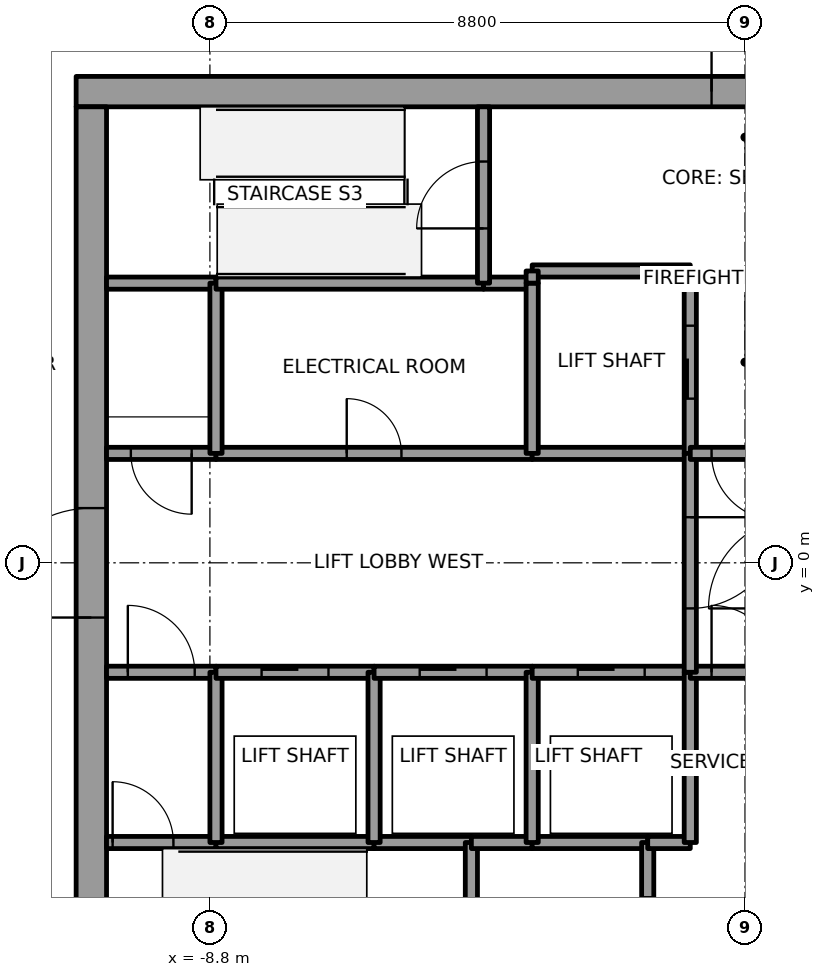
"""IFC4 building model, lengths in metres.
Left out: names, types, materials, properties, quantities, classifications, styles, units other than length and angle.
Written with IfcOpenShell. Run it as: python <this file> out.ifc"""

import sys

from ifc_helpers import new_model, si_unit, direction, frame, frame_2d, origin, place, context, subcontext, project, spatial, rectangle, extrude, element, fill, save


model = new_model("IFC4")
c1 = context("Model", 3, precision=1e-05, world=origin(), true_north=direction((0.0, 1.0)))
c2 = subcontext(c1, "Body", "Model", "MODEL_VIEW")
j1 = project(units=[si_unit("LENGTHUNIT", "METRE"), si_unit("PLANEANGLEUNIT", "RADIAN")], contexts=[c1])
p1 = place(None, origin())
s1 = spatial("IfcSite", under=j1, at=p1, CompositionType="ELEMENT")
p2 = place(p1, origin())
s2 = spatial("IfcBuilding", under=s1, at=p2, CompositionType="ELEMENT")
p3 = place(p2, frame((0.0, 0.0, 247.0)))
s3 = spatial("IfcBuildingStorey", under=s2, at=p3, CompositionType="ELEMENT", Elevation=247.0)
p4 = place(p3, frame((-11.0, 7.75, 0.0), z_axis=(0.0, 0.0, 1.0), x_axis=(1.0, 0.0, 0.0)))
e1 = element("IfcWall", 1, at=p4, inside=s3, PredefinedType="SHEAR", context=c2, shape_type="SweptSolid", body=[
    extrude(rectangle(XDim=22.0, YDim=0.5, at=frame_2d((11.0, 0.0))), origin(), (0.0, 0.0, 1.0), 4.0),
])
p5 = place(p4, frame((10.45, 0.0, 0.0)))
e2 = element("IfcOpeningElement", 2, at=p5, cuts=e1, PredefinedType="OPENING", context=c2, shape_type="SweptSolid", body=[
    extrude(rectangle(XDim=1.1, YDim=2.1, at=frame_2d((0.55, 1.05))), frame((0.0, 0.25, 0.0), z_axis=(0.0, -1.0, 0.0), x_axis=(1.0, 0.0, 0.0)), (0.0, 0.0, 1.0), 0.5),
])
p6 = place(p3, frame((-10.75, -7.5, 0.0), z_axis=(0.0, 0.0, 1.0), x_axis=(0.0, 1.0, 0.0)))
e3 = element("IfcWall", 3, at=p6, inside=s3, PredefinedType="SHEAR", context=c2, shape_type="SweptSolid", body=[
    extrude(rectangle(XDim=15.0, YDim=0.5, at=frame_2d((7.5, 0.0))), origin(), (0.0, 0.0, 1.0), 4.0),
])
p7 = place(p6, frame((6.6, 0.0, 0.0)))
e4 = element("IfcOpeningElement", 4, at=p7, cuts=e3, PredefinedType="OPENING", context=c2, shape_type="SweptSolid", body=[
    extrude(rectangle(XDim=1.8, YDim=2.1, at=frame_2d((0.9, 1.05))), frame((0.0, 0.25, 0.0), z_axis=(0.0, -1.0, 0.0), x_axis=(1.0, 0.0, 0.0)), (0.0, 0.0, 1.0), 0.5),
])
p8 = place(p3, frame((-10.5, -4.6, 0.0), z_axis=(0.0, 0.0, 1.0), x_axis=(1.0, 0.0, 0.0)))
e5 = element("IfcWall", 5, at=p8, inside=s3, PredefinedType="SOLIDWALL", context=c2, shape_type="SweptSolid", body=[
    extrude(rectangle(XDim=1.8, YDim=0.2, at=frame_2d((0.9, 0.0))), origin(), (0.0, 0.0, 1.0), 3.85),
])
p9 = place(p8, frame((0.1, 0.0, 0.0)))
e6 = element("IfcOpeningElement", 6, at=p9, cuts=e5, PredefinedType="OPENING", context=c2, shape_type="SweptSolid", body=[
    extrude(rectangle(XDim=1.0, YDim=2.1, at=frame_2d((0.5, 1.05))), frame((0.0, 0.1, 0.0), z_axis=(0.0, -1.0, 0.0), x_axis=(1.0, 0.0, 0.0)), (0.0, 0.0, 1.0), 0.2),
])
p10 = place(p3, frame((-10.5, -1.8, 0.0), z_axis=(0.0, 0.0, 1.0), x_axis=(1.0, 0.0, 0.0)))
e7 = element("IfcWall", 7, at=p10, inside=s3, PredefinedType="SOLIDWALL", context=c2, shape_type="SweptSolid", body=[
    extrude(rectangle(XDim=1.8, YDim=0.2, at=frame_2d((0.9, 0.0))), origin(), (0.0, 0.0, 1.0), 3.85),
])
p11 = place(p10, frame((0.35, 0.0, 0.0)))
e8 = element("IfcOpeningElement", 8, at=p11, cuts=e7, PredefinedType="OPENING", context=c2, shape_type="SweptSolid", body=[
    extrude(rectangle(XDim=1.1, YDim=2.1, at=frame_2d((0.55, 1.05))), frame((0.0, 0.1, 0.0), z_axis=(0.0, -1.0, 0.0), x_axis=(1.0, 0.0, 0.0)), (0.0, 0.0, 1.0), 0.2),
])
p12 = place(p3, frame((-8.7, 1.8, 0.0), z_axis=(0.0, 0.0, 1.0), x_axis=(-1.0, 0.0, 0.0)))
e9 = element("IfcWall", 9, at=p12, inside=s3, PredefinedType="SOLIDWALL", context=c2, shape_type="SweptSolid", body=[
    extrude(rectangle(XDim=1.8, YDim=0.2, at=frame_2d((0.9, 0.0))), origin(), (0.0, 0.0, 1.0), 3.85),
])
p13 = place(p12, frame((0.4, 0.0, 0.0)))
e10 = element("IfcOpeningElement", 10, at=p13, cuts=e9, PredefinedType="OPENING", context=c2, shape_type="SweptSolid", body=[
    extrude(rectangle(XDim=1.0, YDim=2.1, at=frame_2d((0.5, 1.05))), frame((0.0, 0.1, 0.0), z_axis=(0.0, -1.0, 0.0), x_axis=(1.0, 0.0, 0.0)), (0.0, 0.0, 1.0), 0.2),
])
p14 = place(p3, frame((-8.7, 4.6, 0.0), z_axis=(0.0, 0.0, 1.0), x_axis=(-1.0, 0.0, 0.0)))
e11 = element("IfcWall", 11, at=p14, inside=s3, PredefinedType="SOLIDWALL", context=c2, shape_type="SweptSolid", body=[
    extrude(rectangle(XDim=1.8, YDim=0.2, at=frame_2d((0.9, 0.0))), origin(), (0.0, 0.0, 1.0), 3.85),
])
p15 = place(p3, frame((-8.7, -4.6, 0.0), z_axis=(0.0, 0.0, 1.0), x_axis=(1.0, 0.0, 0.0)))
e12 = element("IfcWall", 12, at=p15, inside=s3, PredefinedType="SOLIDWALL", context=c2, shape_type="SweptSolid", body=[
    extrude(rectangle(XDim=2.6, YDim=0.2, at=frame_2d((1.3, 0.0))), origin(), (0.0, 0.0, 1.0), 3.85),
])
p16 = place(p3, frame((-8.7, -4.6, 0.0), z_axis=(0.0, 0.0, 1.0), x_axis=(0.0, 1.0, 0.0)))
e13 = element("IfcWall", 13, at=p16, inside=s3, PredefinedType="SOLIDWALL", context=c2, shape_type="SweptSolid", body=[
    extrude(rectangle(XDim=2.8, YDim=0.2, at=frame_2d((1.4, 0.0))), origin(), (0.0, 0.0, 1.0), 3.85),
])
p17 = place(p3, frame((-8.7, -1.8, 0.0), z_axis=(0.0, 0.0, 1.0), x_axis=(1.0, 0.0, 0.0)))
e14 = element("IfcWall", 14, at=p17, inside=s3, PredefinedType="SOLIDWALL", context=c2, shape_type="SweptSolid", body=[
    extrude(rectangle(XDim=2.6, YDim=0.2, at=frame_2d((1.3, 0.0))), origin(), (0.0, 0.0, 1.0), 3.85),
])
p18 = place(p17, frame((0.75, 0.0, 0.0)))
e15 = element("IfcOpeningElement", 15, at=p18, cuts=e14, PredefinedType="OPENING", context=c2, shape_type="SweptSolid", body=[
    extrude(rectangle(XDim=1.1, YDim=2.1, at=frame_2d((0.55, 1.05))), frame((0.0, 0.1, 0.0), z_axis=(0.0, -1.0, 0.0), x_axis=(1.0, 0.0, 0.0)), (0.0, 0.0, 1.0), 0.2),
])
p19 = place(p3, frame((-8.7, 1.8, 0.0), z_axis=(0.0, 0.0, 1.0), x_axis=(1.0, 0.0, 0.0)))
e16 = element("IfcWall", 16, at=p19, inside=s3, PredefinedType="SOLIDWALL", context=c2, shape_type="SweptSolid", body=[
    extrude(rectangle(XDim=5.2, YDim=0.2, at=frame_2d((2.6, 0.0))), origin(), (0.0, 0.0, 1.0), 3.85),
])
p20 = place(p19, frame((2.15, 0.0, 0.0)))
e17 = element("IfcOpeningElement", 17, at=p20, cuts=e16, PredefinedType="OPENING", context=c2, shape_type="SweptSolid", body=[
    extrude(rectangle(XDim=0.9, YDim=2.1, at=frame_2d((0.45, 1.05))), frame((0.0, 0.1, 0.0), z_axis=(0.0, -1.0, 0.0), x_axis=(1.0, 0.0, 0.0)), (0.0, 0.0, 1.0), 0.2),
])
p21 = place(p3, frame((-8.7, 4.6, 0.0), z_axis=(0.0, 0.0, 1.0), x_axis=(0.0, -1.0, 0.0)))
e18 = element("IfcWall", 18, at=p21, inside=s3, PredefinedType="SOLIDWALL", context=c2, shape_type="SweptSolid", body=[
    extrude(rectangle(XDim=2.8, YDim=0.2, at=frame_2d((1.4, 0.0))), origin(), (0.0, 0.0, 1.0), 3.85),
])
p22 = place(p3, frame((-4.3, 4.6, 0.0), z_axis=(0.0, 0.0, 1.0), x_axis=(-1.0, 0.0, 0.0)))
e19 = element("IfcWall", 19, at=p22, inside=s3, PredefinedType="SOLIDWALL", context=c2, shape_type="SweptSolid", body=[
    extrude(rectangle(XDim=4.4, YDim=0.2, at=frame_2d((2.2, 0.0))), origin(), (0.0, 0.0, 1.0), 3.85),
])
p23 = place(p3, frame((-6.1, -4.6, 0.0), z_axis=(0.0, 0.0, 1.0), x_axis=(1.0, 0.0, 0.0)))
e20 = element("IfcWall", 20, at=p23, inside=s3, PredefinedType="SOLIDWALL", context=c2, shape_type="SweptSolid", body=[
    extrude(rectangle(XDim=1.6, YDim=0.2, at=frame_2d((0.8, 0.0))), origin(), (0.0, 0.0, 1.0), 3.85),
])
p24 = place(p3, frame((-6.1, -4.6, 0.0), z_axis=(0.0, 0.0, 1.0), x_axis=(0.0, 1.0, 0.0)))
e21 = element("IfcWall", 21, at=p24, inside=s3, PredefinedType="SOLIDWALL", context=c2, shape_type="SweptSolid", body=[
    extrude(rectangle(XDim=2.8, YDim=0.2, at=frame_2d((1.4, 0.0))), origin(), (0.0, 0.0, 1.0), 3.85),
])
p25 = place(p3, frame((-6.1, -1.8, 0.0), z_axis=(0.0, 0.0, 1.0), x_axis=(1.0, 0.0, 0.0)))
e22 = element("IfcWall", 22, at=p25, inside=s3, PredefinedType="SOLIDWALL", context=c2, shape_type="SweptSolid", body=[
    extrude(rectangle(XDim=2.6, YDim=0.2, at=frame_2d((1.3, 0.0))), origin(), (0.0, 0.0, 1.0), 3.85),
])
p26 = place(p25, frame((0.75, 0.0, 0.0)))
e23 = element("IfcOpeningElement", 23, at=p26, cuts=e22, PredefinedType="OPENING", context=c2, shape_type="SweptSolid", body=[
    extrude(rectangle(XDim=1.1, YDim=2.1, at=frame_2d((0.55, 1.05))), frame((0.0, 0.1, 0.0), z_axis=(0.0, -1.0, 0.0), x_axis=(1.0, 0.0, 0.0)), (0.0, 0.0, 1.0), 0.2),
])
p27 = place(p3, frame((-4.5, -4.6, 0.0), z_axis=(0.0, 0.0, 1.0), x_axis=(0.0, -1.0, 0.0)))
e24 = element("IfcWall", 24, at=p27, inside=s3, PredefinedType="SOLIDWALL", context=c2, shape_type="SweptSolid", body=[
    extrude(rectangle(XDim=2.9, YDim=0.2, at=frame_2d((1.45, 0.0))), origin(), (0.0, 0.0, 1.0), 3.85),
])
p28 = place(p3, frame((-4.5, -4.6, 0.0), z_axis=(0.0, 0.0, 1.0), x_axis=(1.0, 0.0, 0.0)))
e25 = element("IfcWall", 25, at=p28, inside=s3, PredefinedType="SOLIDWALL", context=c2, shape_type="SweptSolid", body=[
    extrude(rectangle(XDim=1.0, YDim=0.2, at=frame_2d((0.5, 0.0))), origin(), (0.0, 0.0, 1.0), 3.85),
])
p29 = place(p3, frame((-3.5, 4.6, 0.0), z_axis=(0.0, 0.0, 1.0), x_axis=(-1.0, 0.0, 0.0)))
e26 = element("IfcWall", 26, at=p29, inside=s3, PredefinedType="SOLIDWALL", context=c2, shape_type="SweptSolid", body=[
    extrude(rectangle(XDim=0.8, YDim=0.2, at=frame_2d((0.4, 0.0))), origin(), (0.0, 0.0, 1.0), 3.85),
])
p30 = place(p3, frame((-4.3, 4.6, 0.0), z_axis=(0.0, 0.0, 1.0), x_axis=(0.0, 1.0, 0.0)))
e27 = element("IfcWall", 27, at=p30, inside=s3, PredefinedType="SOLIDWALL", context=c2, shape_type="SweptSolid", body=[
    extrude(rectangle(XDim=2.9, YDim=0.2, at=frame_2d((1.45, 0.0))), origin(), (0.0, 0.0, 1.0), 3.85),
])
p31 = place(p30, frame((0.9, 0.0, 0.0)))
e28 = element("IfcOpeningElement", 28, at=p31, cuts=e27, PredefinedType="OPENING", context=c2, shape_type="SweptSolid", body=[
    extrude(rectangle(XDim=1.1, YDim=2.1, at=frame_2d((0.55, 1.05))), frame((0.0, 0.1, 0.0), z_axis=(0.0, -1.0, 0.0), x_axis=(1.0, 0.0, 0.0)), (0.0, 0.0, 1.0), 0.2),
])
p32 = place(p3, frame((-3.5, -4.6, 0.0), z_axis=(0.0, 0.0, 1.0), x_axis=(1.0, 0.0, 0.0)))
e29 = element("IfcWall", 29, at=p32, inside=s3, PredefinedType="SOLIDWALL", context=c2, shape_type="SweptSolid", body=[
    extrude(rectangle(XDim=1.9, YDim=0.2, at=frame_2d((0.95, 0.0))), origin(), (0.0, 0.0, 1.0), 3.85),
])
p33 = place(p3, frame((-3.5, -4.6, 0.0), z_axis=(0.0, 0.0, 1.0), x_axis=(0.0, 1.0, 0.0)))
e30 = element("IfcWall", 30, at=p33, inside=s3, PredefinedType="SOLIDWALL", context=c2, shape_type="SweptSolid", body=[
    extrude(rectangle(XDim=2.8, YDim=0.2, at=frame_2d((1.4, 0.0))), origin(), (0.0, 0.0, 1.0), 3.85),
])
p34 = place(p3, frame((-3.5, -1.8, 0.0), z_axis=(0.0, 0.0, 1.0), x_axis=(1.0, 0.0, 0.0)))
e31 = element("IfcWall", 31, at=p34, inside=s3, PredefinedType="SOLIDWALL", context=c2, shape_type="SweptSolid", body=[
    extrude(rectangle(XDim=2.6, YDim=0.2, at=frame_2d((1.3, 0.0))), origin(), (0.0, 0.0, 1.0), 3.85),
])
p35 = place(p34, frame((0.75, 0.0, 0.0)))
e32 = element("IfcOpeningElement", 32, at=p35, cuts=e31, PredefinedType="OPENING", context=c2, shape_type="SweptSolid", body=[
    extrude(rectangle(XDim=1.1, YDim=2.1, at=frame_2d((0.55, 1.05))), frame((0.0, 0.1, 0.0), z_axis=(0.0, -1.0, 0.0), x_axis=(1.0, 0.0, 0.0)), (0.0, 0.0, 1.0), 0.2),
])
p36 = place(p3, frame((-0.9, 1.8, 0.0), z_axis=(0.0, 0.0, 1.0), x_axis=(-1.0, 0.0, 0.0)))
e33 = element("IfcWall", 33, at=p36, inside=s3, PredefinedType="SOLIDWALL", context=c2, shape_type="SweptSolid", body=[
    extrude(rectangle(XDim=2.6, YDim=0.2, at=frame_2d((1.3, 0.0))), origin(), (0.0, 0.0, 1.0), 3.85),
])
p37 = place(p3, frame((-3.5, 1.8, 0.0), z_axis=(0.0, 0.0, 1.0), x_axis=(0.0, 1.0, 0.0)))
e34 = element("IfcWall", 34, at=p37, inside=s3, PredefinedType="SOLIDWALL", context=c2, shape_type="SweptSolid", body=[
    extrude(rectangle(XDim=2.8, YDim=0.2, at=frame_2d((1.4, 0.0))), origin(), (0.0, 0.0, 1.0), 3.85),
])
p38 = place(p3, frame((-0.9, 1.8, 0.0), z_axis=(0.0, 0.0, 1.0), x_axis=(0.0, 1.0, 0.0)))
e35 = element("IfcWall", 35, at=p38, inside=s3, PredefinedType="SOLIDWALL", context=c2, shape_type="SweptSolid", body=[
    extrude(rectangle(XDim=3.0, YDim=0.2, at=frame_2d((1.5, 0.0))), origin(), (0.0, 0.0, 1.0), 3.85),
])
p39 = place(p38, frame((0.9, 0.0, 0.0)))
e36 = element("IfcOpeningElement", 36, at=p39, cuts=e35, PredefinedType="OPENING", context=c2, shape_type="SweptSolid", body=[
    extrude(rectangle(XDim=1.2, YDim=2.1, at=frame_2d((0.6, 1.05))), frame((0.0, 0.1, 0.0), z_axis=(0.0, -1.0, 0.0), x_axis=(1.0, 0.0, 0.0)), (0.0, 0.0, 1.0), 0.2),
])
p40 = place(p3, frame((-0.9, 4.8, 0.0), z_axis=(0.0, 0.0, 1.0), x_axis=(-1.0, 0.0, 0.0)))
e37 = element("IfcWall", 37, at=p40, inside=s3, PredefinedType="SOLIDWALL", context=c2, shape_type="SweptSolid", body=[
    extrude(rectangle(XDim=2.6, YDim=0.2, at=frame_2d((1.3, 0.0))), origin(), (0.0, 0.0, 1.0), 3.85),
])
p41 = place(p3, frame((-3.5, 4.8, 0.0), z_axis=(0.0, 0.0, 1.0), x_axis=(0.0, -1.0, 0.0)))
e38 = element("IfcWall", 38, at=p41, inside=s3, PredefinedType="SOLIDWALL", context=c2, shape_type="SweptSolid", body=[
    extrude(rectangle(XDim=0.2, YDim=0.2, at=frame_2d((0.1, 0.0))), origin(), (0.0, 0.0, 1.0), 3.85),
])
p42 = place(p3, frame((-1.6, -7.5, 0.0), z_axis=(0.0, 0.0, 1.0), x_axis=(0.0, 1.0, 0.0)))
e39 = element("IfcWall", 39, at=p42, inside=s3, PredefinedType="SOLIDWALL", context=c2, shape_type="SweptSolid", body=[
    extrude(rectangle(XDim=2.9, YDim=0.2, at=frame_2d((1.45, 0.0))), origin(), (0.0, 0.0, 1.0), 3.85),
])
p43 = place(p42, frame((0.9, 0.0, 0.0)))
e40 = element("IfcOpeningElement", 40, at=p43, cuts=e39, PredefinedType="OPENING", context=c2, shape_type="SweptSolid", body=[
    extrude(rectangle(XDim=1.1, YDim=2.1, at=frame_2d((0.55, 1.05))), frame((0.0, 0.1, 0.0), z_axis=(0.0, -1.0, 0.0), x_axis=(1.0, 0.0, 0.0)), (0.0, 0.0, 1.0), 0.2),
])
p44 = place(p3, frame((-1.6, -4.6, 0.0), z_axis=(0.0, 0.0, 1.0), x_axis=(1.0, 0.0, 0.0)))
e41 = element("IfcWall", 41, at=p44, inside=s3, PredefinedType="SOLIDWALL", context=c2, shape_type="SweptSolid", body=[
    extrude(rectangle(XDim=0.7, YDim=0.2, at=frame_2d((0.35, 0.0))), origin(), (0.0, 0.0, 1.0), 3.85),
])
p45 = place(p3, frame((-0.9, -4.6, 0.0), z_axis=(0.0, 0.0, 1.0), x_axis=(0.0, 1.0, 0.0)))
e42 = element("IfcWall", 42, at=p45, inside=s3, PredefinedType="SOLIDWALL", context=c2, shape_type="SweptSolid", body=[
    extrude(rectangle(XDim=2.8, YDim=0.2, at=frame_2d((1.4, 0.0))), origin(), (0.0, 0.0, 1.0), 3.85),
])
p46 = place(p3, frame((-0.9, -1.8, 0.0), z_axis=(0.0, 0.0, 1.0), x_axis=(1.0, 0.0, 0.0)))
e43 = element("IfcWall", 43, at=p46, inside=s3, PredefinedType="SOLIDWALL", context=c2, shape_type="SweptSolid", body=[
    extrude(rectangle(XDim=1.8, YDim=0.2, at=frame_2d((0.9, 0.0))), origin(), (0.0, 0.0, 1.0), 3.85),
])
p47 = place(p46, frame((0.35, 0.0, 0.0)))
e44 = element("IfcOpeningElement", 44, at=p47, cuts=e43, PredefinedType="OPENING", context=c2, shape_type="SweptSolid", body=[
    extrude(rectangle(XDim=1.1, YDim=2.1, at=frame_2d((0.55, 1.05))), frame((0.0, 0.1, 0.0), z_axis=(0.0, -1.0, 0.0), x_axis=(1.0, 0.0, 0.0)), (0.0, 0.0, 1.0), 0.2),
])
p48 = place(p3, frame((-0.9, 1.8, 0.0), z_axis=(0.0, 0.0, 1.0), x_axis=(0.0, -1.0, 0.0)))
e45 = element("IfcWall", 45, at=p48, inside=s3, PredefinedType="SOLIDWALL", context=c2, shape_type="SweptSolid", body=[
    extrude(rectangle(XDim=3.6, YDim=0.2, at=frame_2d((1.8, 0.0))), origin(), (0.0, 0.0, 1.0), 3.85),
])
p49 = place(p48, frame((1.05, 0.0, 0.0)))
e46 = element("IfcOpeningElement", 46, at=p49, cuts=e45, PredefinedType="OPENING", context=c2, shape_type="SweptSolid", body=[
    extrude(rectangle(XDim=1.5, YDim=2.1, at=frame_2d((0.75, 1.05))), frame((0.0, 0.1, 0.0), z_axis=(0.0, -1.0, 0.0), x_axis=(1.0, 0.0, 0.0)), (0.0, 0.0, 1.0), 0.2),
])
p50 = place(p3, frame((0.9, 1.8, 0.0), z_axis=(0.0, 0.0, 1.0), x_axis=(-1.0, 0.0, 0.0)))
e47 = element("IfcWall", 47, at=p50, inside=s3, PredefinedType="SOLIDWALL", context=c2, shape_type="SweptSolid", body=[
    extrude(rectangle(XDim=1.8, YDim=0.2, at=frame_2d((0.9, 0.0))), origin(), (0.0, 0.0, 1.0), 3.85),
])
p51 = place(p50, frame((0.35, 0.0, 0.0)))
e48 = element("IfcOpeningElement", 48, at=p51, cuts=e47, PredefinedType="OPENING", context=c2, shape_type="SweptSolid", body=[
    extrude(rectangle(XDim=1.1, YDim=2.1, at=frame_2d((0.55, 1.05))), frame((0.0, 0.1, 0.0), z_axis=(0.0, -1.0, 0.0), x_axis=(1.0, 0.0, 0.0)), (0.0, 0.0, 1.0), 0.2),
])
p52 = place(p18, origin())
e49 = element("IfcDoor", 49, at=p52, inside=s3, OperationType="SLIDING_TO_RIGHT", PredefinedType="DOOR", context=c2, shape_type="SweptSolid", body=[
    extrude(rectangle(XDim=1.1, YDim=2.1, at=frame_2d((0.55, 1.05))), frame((0.0, 0.025, 0.0), z_axis=(0.0, -1.0, 0.0), x_axis=(1.0, 0.0, 0.0)), (0.0, 0.0, 1.0), 0.05),
])
fill(e15, e49)
p53 = place(p26, origin())
e50 = element("IfcDoor", 50, at=p53, inside=s3, OperationType="SLIDING_TO_LEFT", PredefinedType="DOOR", context=c2, shape_type="SweptSolid", body=[
    extrude(rectangle(XDim=1.1, YDim=2.1, at=frame_2d((0.55, 1.05))), frame((0.0, 0.025, 0.0), z_axis=(0.0, -1.0, 0.0), x_axis=(1.0, 0.0, 0.0)), (0.0, 0.0, 1.0), 0.05),
])
fill(e23, e50)
p54 = place(p35, origin())
e51 = element("IfcDoor", 51, at=p54, inside=s3, OperationType="SLIDING_TO_LEFT", PredefinedType="DOOR", context=c2, shape_type="SweptSolid", body=[
    extrude(rectangle(XDim=1.1, YDim=2.1, at=frame_2d((0.55, 1.05))), frame((0.0, 0.025, 0.0), z_axis=(0.0, -1.0, 0.0), x_axis=(1.0, 0.0, 0.0)), (0.0, 0.0, 1.0), 0.05),
])
fill(e32, e51)
p55 = place(p39, origin())
e52 = element("IfcDoor", 52, at=p55, inside=s3, OperationType="SLIDING_TO_RIGHT", PredefinedType="DOOR", context=c2, shape_type="SweptSolid", body=[
    extrude(rectangle(XDim=1.2, YDim=2.1, at=frame_2d((0.6, 1.05))), frame((0.0, 0.025, 0.0), z_axis=(0.0, -1.0, 0.0), x_axis=(1.0, 0.0, 0.0)), (0.0, 0.0, 1.0), 0.05),
])
fill(e36, e52)
p56 = place(p49, origin())
e53 = element("IfcDoor", 53, at=p56, inside=s3, OperationType="DOUBLE_DOOR_SINGLE_SWING", PredefinedType="DOOR", context=c2, shape_type="SweptSolid", body=[
    extrude(rectangle(XDim=1.5, YDim=2.1, at=frame_2d((0.75, 1.05))), frame((0.0, 0.025, 0.0), z_axis=(0.0, -1.0, 0.0), x_axis=(1.0, 0.0, 0.0)), (0.0, 0.0, 1.0), 0.05),
])
fill(e46, e53)
p57 = place(p11, origin())
e54 = element("IfcDoor", 54, at=p57, inside=s3, OperationType="SINGLE_SWING_RIGHT", PredefinedType="DOOR", context=c2, shape_type="SweptSolid", body=[
    extrude(rectangle(XDim=1.1, YDim=2.1, at=frame_2d((0.55, 1.05))), frame((0.0, 0.025, 0.0), z_axis=(0.0, -1.0, 0.0), x_axis=(1.0, 0.0, 0.0)), (0.0, 0.0, 1.0), 0.05),
])
fill(e8, e54)
p58 = place(p51, origin())
e55 = element("IfcDoor", 55, at=p58, inside=s3, OperationType="SINGLE_SWING_RIGHT", PredefinedType="DOOR", context=c2, shape_type="SweptSolid", body=[
    extrude(rectangle(XDim=1.1, YDim=2.1, at=frame_2d((0.55, 1.05))), frame((0.0, 0.025, 0.0), z_axis=(0.0, -1.0, 0.0), x_axis=(1.0, 0.0, 0.0)), (0.0, 0.0, 1.0), 0.05),
])
fill(e48, e55)
p59 = place(p47, origin())
e56 = element("IfcDoor", 56, at=p59, inside=s3, OperationType="SINGLE_SWING_RIGHT", PredefinedType="DOOR", context=c2, shape_type="SweptSolid", body=[
    extrude(rectangle(XDim=1.1, YDim=2.1, at=frame_2d((0.55, 1.05))), frame((0.0, 0.025, 0.0), z_axis=(0.0, -1.0, 0.0), x_axis=(1.0, 0.0, 0.0)), (0.0, 0.0, 1.0), 0.05),
])
fill(e44, e56)
p60 = place(p13, origin())
e57 = element("IfcDoor", 57, at=p60, inside=s3, OperationType="SINGLE_SWING_RIGHT", PredefinedType="DOOR", context=c2, shape_type="SweptSolid", body=[
    extrude(rectangle(XDim=1.0, YDim=2.1, at=frame_2d((0.5, 1.05))), frame((0.0, 0.025, 0.0), z_axis=(0.0, -1.0, 0.0), x_axis=(1.0, 0.0, 0.0)), (0.0, 0.0, 1.0), 0.05),
])
fill(e10, e57)
p61 = place(p9, origin())
e58 = element("IfcDoor", 58, at=p61, inside=s3, OperationType="SINGLE_SWING_LEFT", PredefinedType="DOOR", context=c2, shape_type="SweptSolid", body=[
    extrude(rectangle(XDim=1.0, YDim=2.1, at=frame_2d((0.5, 1.05))), frame((0.0, 0.025, 0.0), z_axis=(0.0, -1.0, 0.0), x_axis=(1.0, 0.0, 0.0)), (0.0, 0.0, 1.0), 0.05),
])
fill(e6, e58)
p62 = place(p31, origin())
e59 = element("IfcDoor", 59, at=p62, inside=s3, OperationType="SINGLE_SWING_RIGHT", PredefinedType="DOOR", context=c2, shape_type="SweptSolid", body=[
    extrude(rectangle(XDim=1.1, YDim=2.1, at=frame_2d((0.55, 1.05))), frame((0.0, 0.025, 0.0), z_axis=(0.0, -1.0, 0.0), x_axis=(1.0, 0.0, 0.0)), (0.0, 0.0, 1.0), 0.05),
])
fill(e28, e59)
p63 = place(p20, origin())
e60 = element("IfcDoor", 60, at=p63, inside=s3, OperationType="SINGLE_SWING_LEFT", PredefinedType="DOOR", context=c2, shape_type="SweptSolid", body=[
    extrude(rectangle(XDim=0.9, YDim=2.1, at=frame_2d((0.45, 1.05))), frame((0.0, 0.025, 0.0), z_axis=(0.0, -1.0, 0.0), x_axis=(1.0, 0.0, 0.0)), (0.0, 0.0, 1.0), 0.05),
])
fill(e17, e60)
p64 = place(p7, origin())
e61 = element("IfcDoor", 61, at=p64, inside=s3, OperationType="DOUBLE_DOOR_SINGLE_SWING", PredefinedType="DOOR", context=c2, shape_type="SweptSolid", body=[
    extrude(rectangle(XDim=1.8, YDim=2.1, at=frame_2d((0.9, 1.05))), frame((0.0, 0.025, 0.0), z_axis=(0.0, -1.0, 0.0), x_axis=(1.0, 0.0, 0.0)), (0.0, 0.0, 1.0), 0.05),
])
fill(e4, e61)
p65 = place(p5, origin())
e62 = element("IfcDoor", 62, at=p65, inside=s3, OperationType="SINGLE_SWING_RIGHT", PredefinedType="DOOR", context=c2, shape_type="SweptSolid", body=[
    extrude(rectangle(XDim=1.1, YDim=2.1, at=frame_2d((0.55, 1.05))), frame((0.0, 0.025, 0.0), z_axis=(0.0, -1.0, 0.0), x_axis=(1.0, 0.0, 0.0)), (0.0, 0.0, 1.0), 0.05),
])
fill(e2, e62)
save(model, sys.argv[1])
